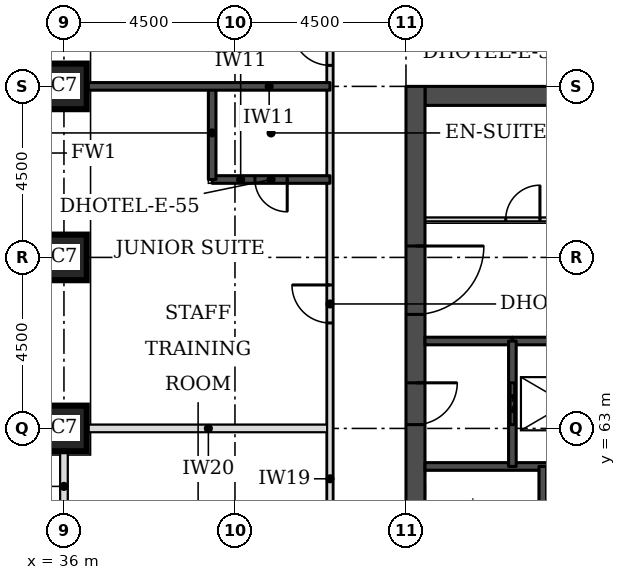
"""IFC4 building model, lengths in metres.
Left out: names, types, materials, properties, quantities, classifications, styles, units other than length and angle.
Written with IfcOpenShell. Run it as: python <this file> out.ifc"""

import sys

from ifc_helpers import new_model, si_unit, direction, frame, frame_2d, origin, origin_2d, place, context, subcontext, project, spatial, rectangle, extrude, element, fill, save


model = new_model("IFC4")
c1 = context("Model", 3, precision=1e-05, world=origin(), true_north=direction((0.0, 1.0)))
c2 = subcontext(c1, "Body", "Model", "MODEL_VIEW")
j1 = project(units=[si_unit("LENGTHUNIT", "METRE"), si_unit("PLANEANGLEUNIT", "RADIAN")], contexts=[c1])
p1 = place(None, origin())
s1 = spatial("IfcSite", under=j1, at=p1, CompositionType="ELEMENT")
p2 = place(p1, origin())
s2 = spatial("IfcBuilding", under=s1, at=p2, CompositionType="ELEMENT")
p3 = place(p2, frame((0.0, 0.0, 62.7)))
s3 = spatial("IfcBuildingStorey", under=s2, at=p3, CompositionType="ELEMENT", Elevation=62.7)
for number, where, z_axis, x_axis in (
    (1, (36.0, 63.0, 0.0), (0.0, 0.0, 1.0), (1.0, 0.0, 0.0)),
    (2, (36.0, 67.5, 0.0), (0.0, 0.0, 1.0), (1.0, 0.0, 0.0)),
    (3, (36.0, 72.0, 0.0), (0.0, 0.0, 1.0), (1.0, 0.0, 0.0)),
):
    element("IfcColumn", number, at=place(p3, frame(where, z_axis=z_axis, x_axis=x_axis)), inside=s3, PredefinedType="COLUMN", context=c2, shape_type="SweptSolid", body=[
        extrude(rectangle(XDim=1.2, YDim=1.2, at=origin_2d()), origin(), (0.0, 0.0, 1.0), 3.3),
    ])
p4 = place(p3, frame((45.5, 71.75, 0.0), z_axis=(0.0, 0.0, 1.0), x_axis=(1.0, 0.0, 0.0)))
e4 = element("IfcWall", 4, at=p4, inside=s3, PredefinedType="SHEAR", context=c2, shape_type="SweptSolid", body=[
    extrude(rectangle(XDim=21.5, YDim=0.5, at=frame_2d((10.75, 0.0))), origin(), (0.0, 0.0, 1.0), 3.3),
])
p5 = place(p3, frame((45.25, 49.5, 0.0), z_axis=(0.0, 0.0, 1.0), x_axis=(0.0, 1.0, 0.0)))
e5 = element("IfcWall", 5, at=p5, inside=s3, PredefinedType="SHEAR", context=c2, shape_type="SweptSolid", body=[
    extrude(rectangle(XDim=22.5, YDim=0.5, at=frame_2d((11.25, 0.0))), origin(), (0.0, 0.0, 1.0), 3.3),
])
p6 = place(p5, frame((4.2, 0.0, 0.0)))
e6 = element("IfcOpeningElement", 6, at=p6, cuts=e5, PredefinedType="OPENING", context=c2, shape_type="SweptSolid", body=[
    extrude(rectangle(XDim=1.8, YDim=2.1, at=frame_2d((0.9, 1.05))), frame((0.0, 0.26, 0.0), z_axis=(0.0, -1.0, 0.0), x_axis=(1.0, 0.0, 0.0)), (0.0, 0.0, 1.0), 0.52),
])
p7 = place(p5, frame((6.9, 0.0, 0.0)))
e7 = element("IfcOpeningElement", 7, at=p7, cuts=e5, PredefinedType="OPENING", context=c2, shape_type="SweptSolid", body=[
    extrude(rectangle(XDim=1.1, YDim=2.1, at=frame_2d((0.55, 1.05))), frame((0.0, 0.26, 0.0), z_axis=(0.0, -1.0, 0.0), x_axis=(1.0, 0.0, 0.0)), (0.0, 0.0, 1.0), 0.52),
])
p8 = place(p5, frame((13.6, 0.0, 0.0)))
e8 = element("IfcOpeningElement", 8, at=p8, cuts=e5, PredefinedType="OPENING", context=c2, shape_type="SweptSolid", body=[
    extrude(rectangle(XDim=1.1, YDim=2.1, at=frame_2d((0.55, 1.05))), frame((0.0, 0.26, 0.0), z_axis=(0.0, -1.0, 0.0), x_axis=(1.0, 0.0, 0.0)), (0.0, 0.0, 1.0), 0.52),
])
p9 = place(p5, frame((16.5, 0.0, 0.0)))
e9 = element("IfcOpeningElement", 9, at=p9, cuts=e5, PredefinedType="OPENING", context=c2, shape_type="SweptSolid", body=[
    extrude(rectangle(XDim=1.8, YDim=2.1, at=frame_2d((0.9, 1.05))), frame((0.0, 0.26, 0.0), z_axis=(0.0, -1.0, 0.0), x_axis=(1.0, 0.0, 0.0)), (0.0, 0.0, 1.0), 0.52),
])
p10 = place(p3, frame((36.0, 57.35, 0.0), z_axis=(0.0, 0.0, 1.0), x_axis=(0.0, 1.0, 0.0)))
e10 = element("IfcWall", 10, at=p10, inside=s3, PredefinedType="PARTITIONING", context=c2, shape_type="SweptSolid", body=[
    extrude(rectangle(XDim=5.05, YDim=0.2, at=frame_2d((2.525, 0.0))), origin(), (0.0, 0.0, 1.0), 2.33),
])
p11 = place(p3, frame((36.6, 63.0, 0.0), z_axis=(0.0, 0.0, 1.0), x_axis=(1.0, 0.0, 0.0)))
e11 = element("IfcWall", 11, at=p11, inside=s3, PredefinedType="PARTITIONING", context=c2, shape_type="SweptSolid", body=[
    extrude(rectangle(XDim=6.4, YDim=0.2, at=frame_2d((3.2, 0.0))), origin(), (0.0, 0.0, 1.0), 3.08),
])
p12 = place(p3, frame((43.0, 57.35, 0.0), z_axis=(0.0, 0.0, 1.0), x_axis=(0.0, 1.0, 0.0)))
e12 = element("IfcWall", 12, at=p12, inside=s3, PredefinedType="PARTITIONING", context=c2, shape_type="SweptSolid", body=[
    extrude(rectangle(XDim=16.65, YDim=0.15, at=frame_2d((8.325, 0.0))), origin(), (0.0, 0.0, 1.0), 3.08),
])
p13 = place(p12, frame((8.425, 0.0, 0.0)))
e13 = element("IfcOpeningElement", 13, at=p13, cuts=e12, PredefinedType="OPENING", context=c2, shape_type="SweptSolid", body=[
    extrude(rectangle(XDim=1.0, YDim=2.1, at=frame_2d((0.5, 1.05))), frame((0.0, 0.085, 0.0), z_axis=(0.0, -1.0, 0.0), x_axis=(1.0, 0.0, 0.0)), (0.0, 0.0, 1.0), 0.17),
])
p14 = place(p12, frame((15.203, 0.0, 0.0)))
e14 = element("IfcOpeningElement", 14, at=p14, cuts=e12, PredefinedType="OPENING", context=c2, shape_type="SweptSolid", body=[
    extrude(rectangle(XDim=1.0, YDim=2.1, at=frame_2d((0.5, 1.05))), frame((0.0, 0.085, 0.0), z_axis=(0.0, -1.0, 0.0), x_axis=(1.0, 0.0, 0.0)), (0.0, 0.0, 1.0), 0.17),
])
p15 = place(p3, frame((39.9, 69.55, 0.0), z_axis=(0.0, 0.0, 1.0), x_axis=(1.0, 0.0, 0.0)))
e15 = element("IfcWall", 15, at=p15, inside=s3, PredefinedType="SOLIDWALL", context=c2, shape_type="SweptSolid", body=[
    extrude(rectangle(XDim=3.1, YDim=0.2, at=frame_2d((1.55, 0.0))), origin(), (0.0, 0.0, 1.0), 3.08),
])
p16 = place(p15, frame((1.125, 0.0, 0.0)))
e16 = element("IfcOpeningElement", 16, at=p16, cuts=e15, PredefinedType="OPENING", context=c2, shape_type="SweptSolid", body=[
    extrude(rectangle(XDim=0.85, YDim=2.1, at=frame_2d((0.425, 1.05))), frame((0.0, 0.11, 0.0), z_axis=(0.0, -1.0, 0.0), x_axis=(1.0, 0.0, 0.0)), (0.0, 0.0, 1.0), 0.22),
])
p17 = place(p3, frame((39.9, 69.55, 0.0), z_axis=(0.0, 0.0, 1.0), x_axis=(0.0, 1.0, 0.0)))
e17 = element("IfcWall", 17, at=p17, inside=s3, PredefinedType="SOLIDWALL", context=c2, shape_type="SweptSolid", body=[
    extrude(rectangle(XDim=2.45, YDim=0.2, at=frame_2d((1.225, 0.0))), origin(), (0.0, 0.0, 1.0), 3.08),
])
p18 = place(p3, frame((36.6, 72.0, 0.0), z_axis=(0.0, 0.0, 1.0), x_axis=(1.0, 0.0, 0.0)))
e18 = element("IfcWall", 18, at=p18, inside=s3, PredefinedType="SOLIDWALL", context=c2, shape_type="SweptSolid", body=[
    extrude(rectangle(XDim=6.4, YDim=0.2, at=frame_2d((3.2, 0.0))), origin(), (0.0, 0.0, 1.0), 3.08),
])
p19 = place(p3, frame((45.5, 62.0, 0.0), z_axis=(0.0, 0.0, 1.0), x_axis=(1.0, 0.0, 0.0)))
e19 = element("IfcWall", 19, at=p19, inside=s3, PredefinedType="SOLIDWALL", context=c2, shape_type="SweptSolid", body=[
    extrude(rectangle(XDim=5.15, YDim=0.2, at=frame_2d((2.575, 0.0))), origin(), (0.0, 0.0, 1.0), 3.08),
])
p20 = place(p3, frame((45.5, 65.3, 0.0), z_axis=(0.0, 0.0, 1.0), x_axis=(1.0, 0.0, 0.0)))
e20 = element("IfcWall", 20, at=p20, inside=s3, PredefinedType="SOLIDWALL", context=c2, shape_type="SweptSolid", body=[
    extrude(rectangle(XDim=2.3, YDim=0.2, at=frame_2d((1.15, 0.0))), origin(), (0.0, 0.0, 1.0), 3.08),
])
p21 = place(p3, frame((47.8, 65.3, 0.0), z_axis=(0.0, 0.0, 1.0), x_axis=(1.0, 0.0, 0.0)))
e21 = element("IfcWall", 21, at=p21, inside=s3, PredefinedType="SOLIDWALL", context=c2, shape_type="SweptSolid", body=[
    extrude(rectangle(XDim=16.9, YDim=0.2, at=frame_2d((8.45, 0.0))), origin(), (0.0, 0.0, 1.0), 3.08),
])
p22 = place(p3, frame((45.5, 68.5, 0.0), z_axis=(0.0, 0.0, 1.0), x_axis=(1.0, 0.0, 0.0)))
e22 = element("IfcWall", 22, at=p22, inside=s3, PredefinedType="PARTITIONING", context=c2, shape_type="SweptSolid", body=[
    extrude(rectangle(XDim=5.15, YDim=0.1, at=frame_2d((2.575, 0.0))), origin(), (0.0, 0.0, 1.0), 3.08),
])
p23 = place(p22, frame((2.125, 0.0, 0.0)))
e23 = element("IfcOpeningElement", 23, at=p23, cuts=e22, PredefinedType="OPENING", context=c2, shape_type="SweptSolid", body=[
    extrude(rectangle(XDim=0.9, YDim=2.1, at=frame_2d((0.45, 1.05))), frame((0.0, 0.06, 0.0), z_axis=(0.0, -1.0, 0.0), x_axis=(1.0, 0.0, 0.0)), (0.0, 0.0, 1.0), 0.12),
])
p24 = place(p3, frame((47.8, 62.0, 0.0), z_axis=(0.0, 0.0, 1.0), x_axis=(0.0, 1.0, 0.0)))
e24 = element("IfcWall", 24, at=p24, inside=s3, PredefinedType="SOLIDWALL", context=c2, shape_type="SweptSolid", body=[
    extrude(rectangle(XDim=3.3, YDim=0.2, at=frame_2d((1.65, 0.0))), origin(), (0.0, 0.0, 1.0), 3.08),
])
p25 = place(p24, frame((1.1, 0.0, 0.0)))
e25 = element("IfcOpeningElement", 25, at=p25, cuts=e24, PredefinedType="OPENING", context=c2, shape_type="SweptSolid", body=[
    extrude(rectangle(XDim=1.1, YDim=2.1, at=frame_2d((0.55, 1.05))), frame((0.0, 0.11, 0.0), z_axis=(0.0, -1.0, 0.0), x_axis=(1.0, 0.0, 0.0)), (0.0, 0.0, 1.0), 0.22),
])
p26 = place(p3, frame((48.6, 56.2, 0.0), z_axis=(0.0, 0.0, 1.0), x_axis=(0.0, 1.0, 0.0)))
e26 = element("IfcWall", 26, at=p26, inside=s3, PredefinedType="SOLIDWALL", context=c2, shape_type="SweptSolid", body=[
    extrude(rectangle(XDim=5.8, YDim=0.2, at=frame_2d((2.9, 0.0))), origin(), (0.0, 0.0, 1.0), 3.08),
])
p27 = place(p13, origin())
e27 = element("IfcDoor", 27, at=p27, inside=s3, OperationType="SINGLE_SWING_RIGHT", PredefinedType="DOOR", context=c2, shape_type="SweptSolid", body=[
    extrude(rectangle(XDim=1.0, YDim=2.1, at=frame_2d((0.5, 1.05))), frame((0.0, 0.025, 0.0), z_axis=(0.0, -1.0, 0.0), x_axis=(1.0, 0.0, 0.0)), (0.0, 0.0, 1.0), 0.05),
])
fill(e13, e27)
p28 = place(p16, frame((0.85, 0.0, 0.0), z_axis=(0.0, 0.0, 1.0), x_axis=(-1.0, 0.0, 0.0)))
e28 = element("IfcDoor", 28, at=p28, inside=s3, OperationType="SINGLE_SWING_LEFT", PredefinedType="DOOR", context=c2, shape_type="SweptSolid", body=[
    extrude(rectangle(XDim=0.85, YDim=2.1, at=frame_2d((0.425, 1.05))), frame((0.0, 0.025, 0.0), z_axis=(0.0, -1.0, 0.0), x_axis=(1.0, 0.0, 0.0)), (0.0, 0.0, 1.0), 0.05),
])
fill(e16, e28)
p29 = place(p14, origin())
e29 = element("IfcDoor", 29, at=p29, inside=s3, OperationType="SINGLE_SWING_RIGHT", PredefinedType="DOOR", context=c2, shape_type="SweptSolid", body=[
    extrude(rectangle(XDim=1.0, YDim=2.1, at=frame_2d((0.5, 1.05))), frame((0.0, 0.025, 0.0), z_axis=(0.0, -1.0, 0.0), x_axis=(1.0, 0.0, 0.0)), (0.0, 0.0, 1.0), 0.05),
])
fill(e14, e29)
p30 = place(p25, origin())
e30 = element("IfcDoor", 30, at=p30, inside=s3, OperationType="DOUBLE_DOOR_SLIDING", PredefinedType="DOOR", context=c2, shape_type="SweptSolid", body=[
    extrude(rectangle(XDim=1.1, YDim=2.1, at=frame_2d((0.55, 1.05))), frame((0.0, 0.025, 0.0), z_axis=(0.0, -1.0, 0.0), x_axis=(1.0, 0.0, 0.0)), (0.0, 0.0, 1.0), 0.05),
])
fill(e25, e30)
p31 = place(p8, frame((1.1, 0.0, 0.0), z_axis=(0.0, 0.0, 1.0), x_axis=(-1.0, 0.0, 0.0)))
e31 = element("IfcDoor", 31, at=p31, inside=s3, OperationType="SINGLE_SWING_LEFT", PredefinedType="DOOR", context=c2, shape_type="SweptSolid", body=[
    extrude(rectangle(XDim=1.1, YDim=2.1, at=frame_2d((0.55, 1.05))), frame((0.0, 0.025, 0.0), z_axis=(0.0, -1.0, 0.0), x_axis=(1.0, 0.0, 0.0)), (0.0, 0.0, 1.0), 0.05),
])
fill(e8, e31)
p32 = place(p9, frame((1.8, 0.0, 0.0), z_axis=(0.0, 0.0, 1.0), x_axis=(-1.0, 0.0, 0.0)))
e32 = element("IfcDoor", 32, at=p32, inside=s3, OperationType="SINGLE_SWING_LEFT", PredefinedType="DOOR", context=c2, shape_type="SweptSolid", body=[
    extrude(rectangle(XDim=1.8, YDim=2.1, at=frame_2d((0.9, 1.05))), frame((0.0, 0.025, 0.0), z_axis=(0.0, -1.0, 0.0), x_axis=(1.0, 0.0, 0.0)), (0.0, 0.0, 1.0), 0.05),
])
fill(e9, e32)
p33 = place(p23, origin())
e33 = element("IfcDoor", 33, at=p33, inside=s3, OperationType="SINGLE_SWING_RIGHT", PredefinedType="DOOR", context=c2, shape_type="SweptSolid", body=[
    extrude(rectangle(XDim=0.9, YDim=2.1, at=frame_2d((0.45, 1.05))), frame((0.0, 0.025, 0.0), z_axis=(0.0, -1.0, 0.0), x_axis=(1.0, 0.0, 0.0)), (0.0, 0.0, 1.0), 0.05),
])
fill(e23, e33)
save(model, sys.argv[1])
